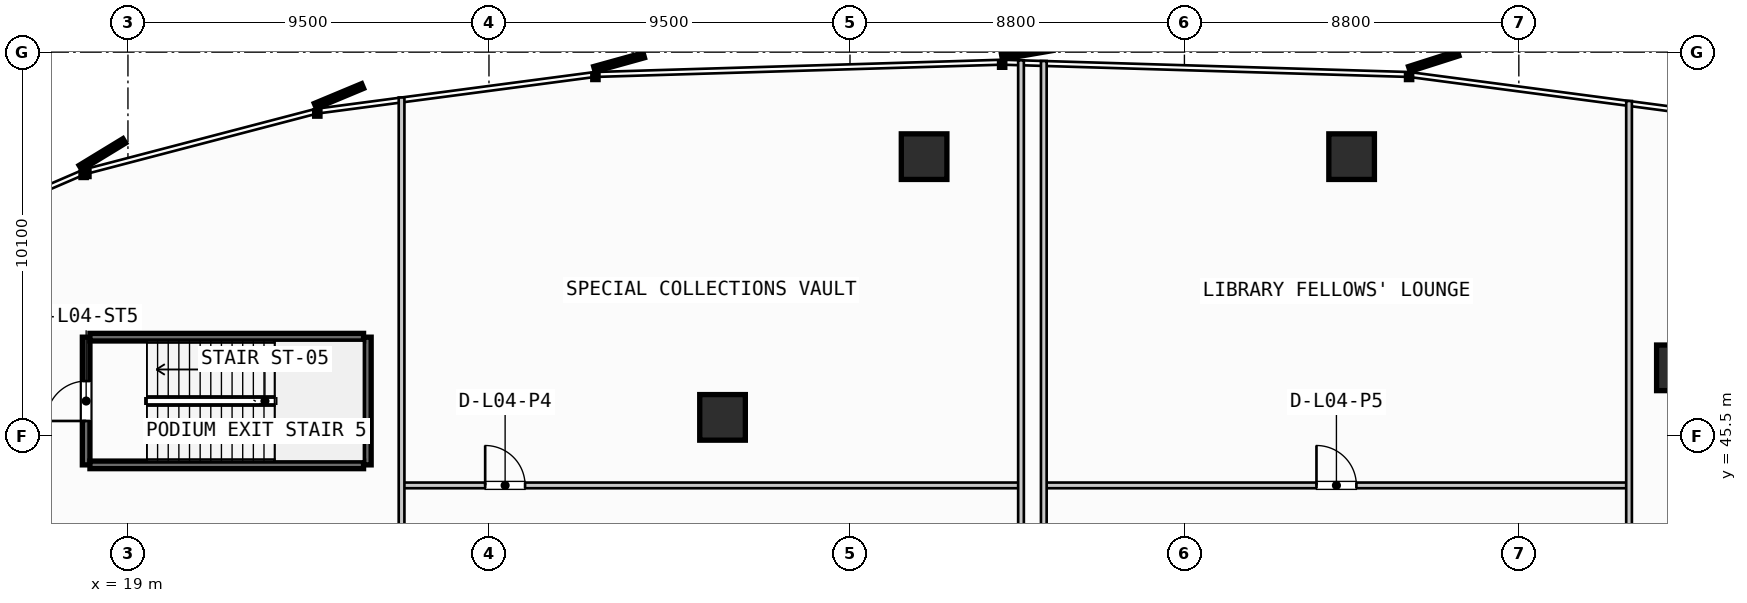
"""IFC4 building model, lengths in metres.
Left out: names, types, materials, properties, quantities, classifications, styles, units other than length and angle.
Written with IfcOpenShell. Run it as: python <this file> out.ifc"""

import sys

from ifc_helpers import new_model, si_unit, direction, frame, frame_2d, origin, origin_2d, place, context, subcontext, project, spatial, rectangle, hollow_rectangle, extrude, source, transform, mapped, element, fill, save


model = new_model("IFC4")
c1 = context("Model", 3, precision=1e-05, world=origin(), true_north=direction((0.0, 1.0)))
c2 = subcontext(c1, "Body", "Model", "MODEL_VIEW")
j1 = project(units=[si_unit("LENGTHUNIT", "METRE"), si_unit("PLANEANGLEUNIT", "RADIAN")], contexts=[c1])
p1 = place(None, origin())
s1 = spatial("IfcSite", under=j1, at=p1, CompositionType="ELEMENT")
p2 = place(p1, origin())
s2 = spatial("IfcBuilding", under=s1, at=p2, CompositionType="ELEMENT")
p3 = place(p2, frame((0.0, 0.0, 19.6)))
s3 = spatial("IfcBuildingStorey", under=s2, at=p3, CompositionType="ELEMENT", Elevation=19.6)
m1 = source(origin(), c2, "Body", "SweptSolid", [
    extrude(hollow_rectangle(XDim=1.2, YDim=1.2, WallThickness=0.045, InnerFilletRadius=0.02, OuterFilletRadius=0.065, at=origin_2d()), origin(), (0.0, 0.0, 1.0), 4.08),
])
for number, where, z_axis, x_axis in (
    (1, (59.825, 47.293, 0.0), (0.0, 0.0, 1.0), (1.0, 0.0, 0.0)),
    (2, (51.2, 52.85, 0.0), (0.0, 0.0, 1.0), (1.0, 0.0, 0.0)),
    (3, (39.95, 52.85, 0.0), (0.0, 0.0, 1.0), (1.0, 0.0, 0.0)),
    (4, (34.646, 45.99, 0.0), (0.0, 0.0, 1.0), (1.0, 0.0, 0.0)),
):
    element("IfcColumn", number, at=place(p3, frame(where, z_axis=z_axis, x_axis=x_axis)), inside=s3, PredefinedType="COLUMN", context=c2, shape_type="MappedRepresentation", body=[
        mapped(m1, transform((0.0, 0.0, 0.0), scale=1.0)),
    ])
p4 = place(p3, frame((17.9, 44.74, 0.0), z_axis=(0.0, 0.0, 1.0), x_axis=(0.0, 1.0, 0.0)))
e5 = element("IfcWall", 5, at=p4, inside=s3, PredefinedType="SHEAR", context=c2, shape_type="SweptSolid", body=[
    extrude(rectangle(XDim=3.36, YDim=0.2, at=frame_2d((1.68, 0.0))), origin(), (0.0, 0.0, 1.0), 4.08),
])
p5 = place(p4, frame((1.155, 0.0, 0.0)))
e6 = element("IfcOpeningElement", 6, at=p5, cuts=e5, PredefinedType="OPENING", context=c2, shape_type="SweptSolid", body=[
    extrude(rectangle(XDim=1.05, YDim=2.15, at=frame_2d((0.525, 1.075))), frame((0.0, 0.11, 0.0), z_axis=(0.0, -1.0, 0.0), x_axis=(1.0, 0.0, 0.0)), (0.0, 0.0, 1.0), 0.22),
])
p6 = place(p3, frame((25.3, 48.1, 0.0), z_axis=(0.0, 0.0, 1.0), x_axis=(0.0, -1.0, 0.0)))
e7 = element("IfcWall", 7, at=p6, inside=s3, PredefinedType="SHEAR", context=c2, shape_type="SweptSolid", body=[
    extrude(rectangle(XDim=3.36, YDim=0.2, at=frame_2d((1.68, 0.0))), origin(), (0.0, 0.0, 1.0), 4.08),
])
for number, where, z_axis, x_axis in (
    (8, (25.2, 44.74, 0.0), (0.0, 0.0, 1.0), (-1.0, 0.0, 0.0)),
    (9, (18.0, 48.1, 0.0), (0.0, 0.0, 1.0), (1.0, 0.0, 0.0)),
):
    element("IfcWall", number, at=place(p3, frame(where, z_axis=z_axis, x_axis=x_axis)), inside=s3, PredefinedType="SHEAR", context=c2, shape_type="SweptSolid", body=[
        extrude(rectangle(XDim=7.2, YDim=0.2, at=frame_2d((3.6, 0.0))), origin(), (0.0, 0.0, 1.0), 4.08),
    ])
p7 = place(p3, frame((26.2, 44.2, 0.0), z_axis=(0.0, 0.0, 1.0), x_axis=(1.0, 0.0, 0.0)))
e10 = element("IfcWall", 10, at=p7, inside=s3, PredefinedType="PARTITIONING", context=c2, shape_type="SweptSolid", body=[
    extrude(rectangle(XDim=16.3, YDim=0.15, at=frame_2d((8.15, 0.0))), origin(), (0.0, 0.0, 1.0), 3.293),
])
p8 = place(p7, frame((2.2, 0.0, 0.0)))
e11 = element("IfcOpeningElement", 11, at=p8, cuts=e10, PredefinedType="OPENING", context=c2, shape_type="SweptSolid", body=[
    extrude(rectangle(XDim=1.05, YDim=2.15, at=frame_2d((0.525, 1.075))), frame((0.0, 0.085, 0.0), z_axis=(0.0, -1.0, 0.0), x_axis=(1.0, 0.0, 0.0)), (0.0, 0.0, 1.0), 0.17),
])
p9 = place(p3, frame((26.2, 42.2, 0.0), z_axis=(0.0, 0.0, 1.0), x_axis=(0.0, 1.0, 0.0)))
e12 = element("IfcWall", 12, at=p9, inside=s3, PredefinedType="PARTITIONING", context=c2, shape_type="SweptSolid", body=[
    extrude(rectangle(XDim=12.207, YDim=0.15, at=frame_2d((6.104, 0.0))), origin(), (0.0, 0.0, 1.0), 3.293),
])
p10 = place(p3, frame((42.5, 42.2, 0.0), z_axis=(0.0, 0.0, 1.0), x_axis=(0.0, 1.0, 0.0)))
e13 = element("IfcWall", 13, at=p10, inside=s3, PredefinedType="PARTITIONING", context=c2, shape_type="SweptSolid", body=[
    extrude(rectangle(XDim=13.185, YDim=0.15, at=frame_2d((6.593, 0.0))), origin(), (0.0, 0.0, 1.0), 3.293),
])
p11 = place(p3, frame((43.1, 44.2, 0.0), z_axis=(0.0, 0.0, 1.0), x_axis=(1.0, 0.0, 0.0)))
e14 = element("IfcWall", 14, at=p11, inside=s3, PredefinedType="PARTITIONING", context=c2, shape_type="SweptSolid", body=[
    extrude(rectangle(XDim=15.4, YDim=0.15, at=frame_2d((7.7, 0.0))), origin(), (0.0, 0.0, 1.0), 3.293),
])
p12 = place(p11, frame((7.175, 0.0, 0.0)))
e15 = element("IfcOpeningElement", 15, at=p12, cuts=e14, PredefinedType="OPENING", context=c2, shape_type="SweptSolid", body=[
    extrude(rectangle(XDim=1.05, YDim=2.15, at=frame_2d((0.525, 1.075))), frame((0.0, 0.085, 0.0), z_axis=(0.0, -1.0, 0.0), x_axis=(1.0, 0.0, 0.0)), (0.0, 0.0, 1.0), 0.17),
])
p13 = place(p3, frame((43.1, 42.2, 0.0), z_axis=(0.0, 0.0, 1.0), x_axis=(0.0, 1.0, 0.0)))
e16 = element("IfcWall", 16, at=p13, inside=s3, PredefinedType="PARTITIONING", context=c2, shape_type="SweptSolid", body=[
    extrude(rectangle(XDim=13.167, YDim=0.15, at=frame_2d((6.583, 0.0))), origin(), (0.0, 0.0, 1.0), 3.293),
])
p14 = place(p3, frame((58.5, 42.2, 0.0), z_axis=(0.0, 0.0, 1.0), x_axis=(0.0, 1.0, 0.0)))
e17 = element("IfcWall", 17, at=p14, inside=s3, PredefinedType="PARTITIONING", context=c2, shape_type="SweptSolid", body=[
    extrude(rectangle(XDim=12.115, YDim=0.15, at=frame_2d((6.057, 0.0))), origin(), (0.0, 0.0, 1.0), 3.293),
])
m2 = source(origin(), c2, "Body", "SweptSolid", [
    extrude(rectangle(XDim=1.05, YDim=2.15, at=frame_2d((0.525, 1.075))), frame((0.0, 0.025, 0.0), z_axis=(0.0, -1.0, 0.0), x_axis=(1.0, 0.0, 0.0)), (0.0, 0.0, 1.0), 0.05),
])
p15 = place(p5, origin())
e18 = element("IfcDoor", 18, at=p15, inside=s3, OperationType="SINGLE_SWING_LEFT", PredefinedType="DOOR", context=c2, shape_type="MappedRepresentation", body=[
    mapped(m2, transform((0.0, 0.0, 0.0), scale=1.0)),
])
fill(e6, e18)
p16 = place(p8, origin())
e19 = element("IfcDoor", 19, at=p16, inside=s3, OperationType="SINGLE_SWING_LEFT", PredefinedType="DOOR", context=c2, shape_type="MappedRepresentation", body=[
    mapped(m2, transform((0.0, 0.0, 0.0), scale=1.0)),
])
fill(e11, e19)
p17 = place(p12, origin())
e20 = element("IfcDoor", 20, at=p17, inside=s3, OperationType="SINGLE_SWING_LEFT", PredefinedType="DOOR", context=c2, shape_type="MappedRepresentation", body=[
    mapped(m2, transform((0.0, 0.0, 0.0), scale=1.0)),
])
fill(e15, e20)
save(model, sys.argv[1])
